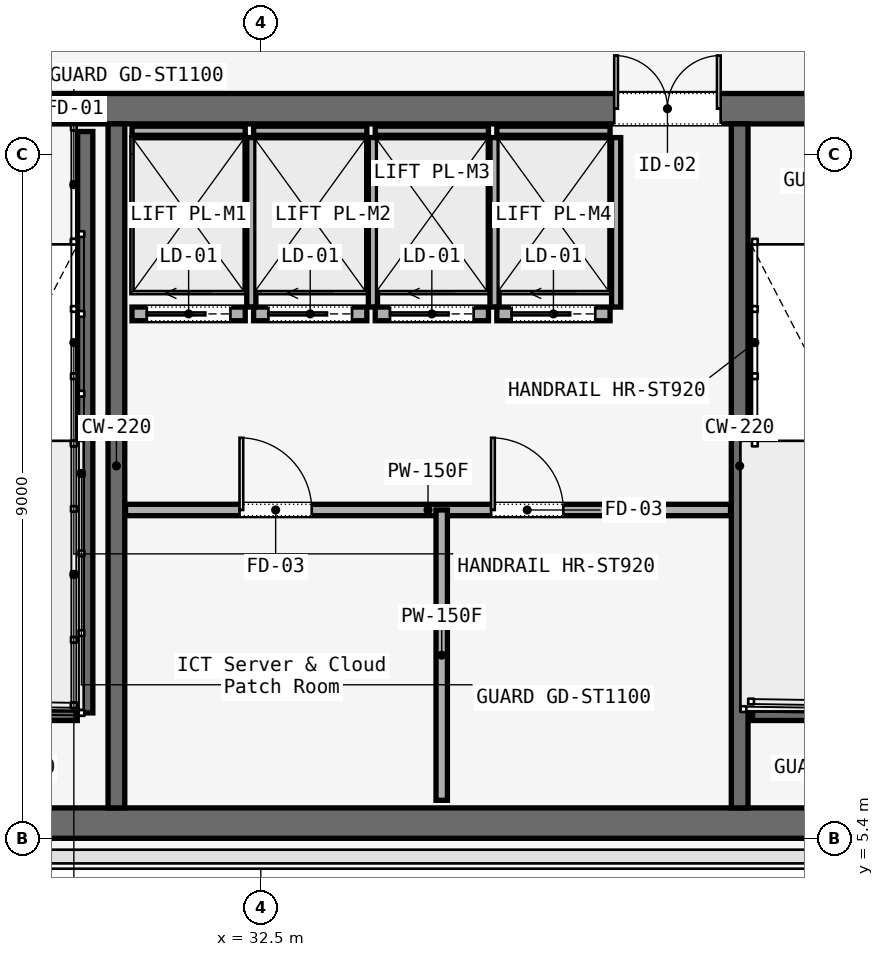
"""IFC4 building model, lengths in metres.
Left out: names, types, materials, properties, quantities, classifications, styles, units other than length and angle.
Written with IfcOpenShell. Run it as: python <this file> out.ifc"""

import sys

from ifc_helpers import new_model, si_unit, direction, frame, frame_2d, origin, place, context, subcontext, project, spatial, rectangle, extrude, element, fill, save


model = new_model("IFC4")
c1 = context("Model", 3, precision=1e-05, world=origin(), true_north=direction((0.0, 1.0)))
c2 = subcontext(c1, "Body", "Model", "MODEL_VIEW")
j1 = project(units=[si_unit("LENGTHUNIT", "METRE"), si_unit("PLANEANGLEUNIT", "RADIAN")], contexts=[c1])
p1 = place(None, origin())
s1 = spatial("IfcSite", under=j1, at=p1, CompositionType="ELEMENT")
p2 = place(p1, origin())
s2 = spatial("IfcBuilding", under=s1, at=p2, CompositionType="ELEMENT")
p3 = place(p2, frame((0.0, 0.0, 191.6)))
s3 = spatial("IfcBuildingStorey", under=s2, at=p3, CompositionType="ELEMENT", Elevation=191.6)
p4 = place(p3, frame((26.45, 15.0, 0.0), z_axis=(0.0, 0.0, 1.0), x_axis=(1.0, 0.0, 0.0)))
e1 = element("IfcWall", 1, at=p4, inside=s3, PredefinedType="SOLIDWALL", context=c2, shape_type="SweptSolid", body=[
    extrude(rectangle(XDim=31.1, YDim=0.4, at=frame_2d((15.55, 0.0))), origin(), (0.0, 0.0, 1.0), 3.58),
])
p5 = place(p4, frame((1.65, 0.0, 0.0)))
e2 = element("IfcOpeningElement", 2, at=p5, cuts=e1, PredefinedType="OPENING", context=c2, shape_type="SweptSolid", body=[
    extrude(rectangle(XDim=1.1, YDim=2.2, at=frame_2d((0.55, 1.1))), frame((0.0, 0.2, 0.0), z_axis=(0.0, -1.0, 0.0), x_axis=(1.0, 0.0, 0.0)), (0.0, 0.0, 1.0), 0.4),
])
p6 = place(p4, frame((13.65, 0.0, 0.0)))
e3 = element("IfcOpeningElement", 3, at=p6, cuts=e1, PredefinedType="OPENING", context=c2, shape_type="SweptSolid", body=[
    extrude(rectangle(XDim=1.1, YDim=2.2, at=frame_2d((0.55, 1.1))), frame((0.0, 0.2, 0.0), z_axis=(0.0, -1.0, 0.0), x_axis=(1.0, 0.0, 0.0)), (0.0, 0.0, 1.0), 0.4),
])
p7 = place(p4, frame((25.55, 0.0, 0.0)))
e4 = element("IfcOpeningElement", 4, at=p7, cuts=e1, PredefinedType="OPENING", context=c2, shape_type="SweptSolid", body=[
    extrude(rectangle(XDim=1.1, YDim=2.2, at=frame_2d((0.55, 1.1))), frame((0.0, 0.2, 0.0), z_axis=(0.0, -1.0, 0.0), x_axis=(1.0, 0.0, 0.0)), (0.0, 0.0, 1.0), 0.4),
])
p8 = place(p4, frame((10.7, 0.0, 0.0)))
e5 = element("IfcOpeningElement", 5, at=p8, cuts=e1, PredefinedType="OPENING", context=c2, shape_type="SweptSolid", body=[
    extrude(rectangle(XDim=1.4, YDim=2.2, at=frame_2d((0.7, 1.1))), frame((0.0, 0.2, 0.0), z_axis=(0.0, -1.0, 0.0), x_axis=(1.0, 0.0, 0.0)), (0.0, 0.0, 1.0), 0.4),
])
p9 = place(p4, frame((19.35, 0.0, 0.0)))
e6 = element("IfcOpeningElement", 6, at=p9, cuts=e1, PredefinedType="OPENING", context=c2, shape_type="SweptSolid", body=[
    extrude(rectangle(XDim=1.1, YDim=2.2, at=frame_2d((0.55, 1.1))), frame((0.0, 0.2, 0.0), z_axis=(0.0, -1.0, 0.0), x_axis=(1.0, 0.0, 0.0)), (0.0, 0.0, 1.0), 0.4),
])
p10 = place(p4, frame((21.4, 0.0, 0.0)))
e7 = element("IfcOpeningElement", 7, at=p10, cuts=e1, PredefinedType="OPENING", context=c2, shape_type="SweptSolid", body=[
    extrude(rectangle(XDim=0.9, YDim=2.1, at=frame_2d((0.45, 1.05))), frame((0.0, 0.2, 0.0), z_axis=(0.0, -1.0, 0.0), x_axis=(1.0, 0.0, 0.0)), (0.0, 0.0, 1.0), 0.4),
])
p11 = place(p4, frame((23.35, 0.0, 0.0)))
e8 = element("IfcOpeningElement", 8, at=p11, cuts=e1, PredefinedType="OPENING", context=c2, shape_type="SweptSolid", body=[
    extrude(rectangle(XDim=1.3, YDim=2.3, at=frame_2d((0.65, 1.15))), frame((0.0, 0.2, 0.0), z_axis=(0.0, -1.0, 0.0), x_axis=(1.0, 0.0, 0.0)), (0.0, 0.0, 1.0), 0.4),
])
p12 = place(p3, frame((26.45, 5.6, 0.0), z_axis=(0.0, 0.0, 1.0), x_axis=(1.0, 0.0, 0.0)))
e9 = element("IfcWall", 9, at=p12, inside=s3, PredefinedType="SOLIDWALL", context=c2, shape_type="SweptSolid", body=[
    extrude(rectangle(XDim=31.1, YDim=0.4, at=frame_2d((15.55, 0.0))), origin(), (0.0, 0.0, 1.0), 3.58),
])
for number, where, z_axis, x_axis in (
    (10, (30.6, 5.8, 0.0), (0.0, 0.0, 1.0), (0.0, 1.0, 0.0)),
    (11, (38.8, 5.8, 0.0), (0.0, 0.0, 1.0), (0.0, 1.0, 0.0)),
):
    element("IfcWall", number, at=place(p3, frame(where, z_axis=z_axis, x_axis=x_axis)), inside=s3, PredefinedType="SOLIDWALL", context=c2, shape_type="SweptSolid", body=[
        extrude(rectangle(XDim=9.0, YDim=0.22, at=frame_2d((4.5, 0.0))), origin(), (0.0, 0.0, 1.0), 3.58),
    ])
p13 = place(p3, frame((30.19, 14.7, 0.0), z_axis=(0.0, 0.0, 1.0), x_axis=(0.0, -1.0, 0.0)))
e12 = element("IfcWall", 12, at=p13, inside=s3, PredefinedType="SOLIDWALL", context=c2, shape_type="SweptSolid", body=[
    extrude(rectangle(XDim=7.65, YDim=0.2, at=frame_2d((3.825, 0.0))), origin(), (0.0, 0.0, 1.0), 3.8),
])
for number, where, z_axis, x_axis in (
    (13, (26.97, 7.05, 0.0), (0.0, 0.0, 1.0), (1.0, 0.0, 0.0)),
    (14, (38.97, 7.05, 0.0), (0.0, 0.0, 1.0), (1.0, 0.0, 0.0)),
):
    element("IfcWall", number, at=place(p3, frame(where, z_axis=z_axis, x_axis=x_axis)), inside=s3, PredefinedType="SOLIDWALL", context=c2, shape_type="SweptSolid", body=[
        extrude(rectangle(XDim=3.115, YDim=0.2, at=frame_2d((1.558, 0.0))), origin(), (0.0, 0.0, 1.0), 3.8),
    ])
p14 = place(p3, frame((30.72, 9.72, 0.0), z_axis=(0.0, 0.0, 1.0), x_axis=(1.0, 0.0, 0.0)))
e15 = element("IfcWall", 15, at=p14, inside=s3, PredefinedType="PARTITIONING", context=c2, shape_type="SweptSolid", body=[
    extrude(rectangle(XDim=7.96, YDim=0.15, at=frame_2d((3.98, 0.0))), origin(), (0.0, 0.0, 1.0), 3.01),
])
p15 = place(p14, frame((1.5, 0.0, 0.0)))
e16 = element("IfcOpeningElement", 16, at=p15, cuts=e15, PredefinedType="OPENING", context=c2, shape_type="SweptSolid", body=[
    extrude(rectangle(XDim=0.95, YDim=2.2, at=frame_2d((0.475, 1.1))), frame((0.0, 0.075, 0.0), z_axis=(0.0, -1.0, 0.0), x_axis=(1.0, 0.0, 0.0)), (0.0, 0.0, 1.0), 0.15),
])
p16 = place(p14, frame((4.81, 0.0, 0.0)))
e17 = element("IfcOpeningElement", 17, at=p16, cuts=e15, PredefinedType="OPENING", context=c2, shape_type="SweptSolid", body=[
    extrude(rectangle(XDim=0.95, YDim=2.2, at=frame_2d((0.475, 1.1))), frame((0.0, 0.075, 0.0), z_axis=(0.0, -1.0, 0.0), x_axis=(1.0, 0.0, 0.0)), (0.0, 0.0, 1.0), 0.15),
])
p17 = place(p3, frame((34.88, 5.9, 0.0), z_axis=(0.0, 0.0, 1.0), x_axis=(0.0, 1.0, 0.0)))
e18 = element("IfcWall", 18, at=p17, inside=s3, PredefinedType="PARTITIONING", context=c2, shape_type="SweptSolid", body=[
    extrude(rectangle(XDim=3.82, YDim=0.15, at=frame_2d((1.91, 0.0))), origin(), (0.0, 0.0, 1.0), 3.01),
])
p18 = place(p3, frame((30.805, 12.3, 0.0), z_axis=(0.0, 0.0, 1.0), x_axis=(1.0, 0.0, 0.0)))
e19 = element("IfcWall", 19, at=p18, inside=s3, PredefinedType="SOLIDWALL", context=c2, shape_type="SweptSolid", body=[
    extrude(rectangle(XDim=1.49, YDim=0.18, at=frame_2d((0.745, 0.0))), origin(), (0.0, 0.0, 1.0), 3.01),
])
p19 = place(p18, frame((0.195, 0.0, 0.0)))
e20 = element("IfcOpeningElement", 20, at=p19, cuts=e19, PredefinedType="OPENING", context=c2, shape_type="SweptSolid", body=[
    extrude(rectangle(XDim=1.1, YDim=2.2, at=frame_2d((0.55, 1.1))), frame((0.0, 0.09, 0.0), z_axis=(0.0, -1.0, 0.0), x_axis=(1.0, 0.0, 0.0)), (0.0, 0.0, 1.0), 0.18),
])
p20 = place(p3, frame((30.805, 14.71, 0.0), z_axis=(0.0, 0.0, 1.0), x_axis=(1.0, 0.0, 0.0)))
e21 = element("IfcWall", 21, at=p20, inside=s3, PredefinedType="SOLIDWALL", context=c2, shape_type="SweptSolid", body=[
    extrude(rectangle(XDim=1.49, YDim=0.12, at=frame_2d((0.745, 0.0))), origin(), (0.0, 0.0, 1.0), 3.01),
])
p21 = place(p3, frame((32.375, 12.39, 0.0), z_axis=(0.0, 0.0, 1.0), x_axis=(0.0, 1.0, 0.0)))
e22 = element("IfcWall", 22, at=p21, inside=s3, PredefinedType="SOLIDWALL", context=c2, shape_type="SweptSolid", body=[
    extrude(rectangle(XDim=2.23, YDim=0.12, at=frame_2d((1.115, 0.0))), origin(), (0.0, 0.0, 1.0), 3.01),
])
p22 = place(p3, frame((32.405, 12.3, 0.0), z_axis=(0.0, 0.0, 1.0), x_axis=(1.0, 0.0, 0.0)))
e23 = element("IfcWall", 23, at=p22, inside=s3, PredefinedType="SOLIDWALL", context=c2, shape_type="SweptSolid", body=[
    extrude(rectangle(XDim=1.49, YDim=0.18, at=frame_2d((0.745, 0.0))), origin(), (0.0, 0.0, 1.0), 3.01),
])
p23 = place(p22, frame((0.195, 0.0, 0.0)))
e24 = element("IfcOpeningElement", 24, at=p23, cuts=e23, PredefinedType="OPENING", context=c2, shape_type="SweptSolid", body=[
    extrude(rectangle(XDim=1.1, YDim=2.2, at=frame_2d((0.55, 1.1))), frame((0.0, 0.09, 0.0), z_axis=(0.0, -1.0, 0.0), x_axis=(1.0, 0.0, 0.0)), (0.0, 0.0, 1.0), 0.18),
])
p24 = place(p3, frame((32.405, 14.71, 0.0), z_axis=(0.0, 0.0, 1.0), x_axis=(1.0, 0.0, 0.0)))
e25 = element("IfcWall", 25, at=p24, inside=s3, PredefinedType="SOLIDWALL", context=c2, shape_type="SweptSolid", body=[
    extrude(rectangle(XDim=1.49, YDim=0.12, at=frame_2d((0.745, 0.0))), origin(), (0.0, 0.0, 1.0), 3.01),
])
p25 = place(p3, frame((33.975, 12.39, 0.0), z_axis=(0.0, 0.0, 1.0), x_axis=(0.0, 1.0, 0.0)))
e26 = element("IfcWall", 26, at=p25, inside=s3, PredefinedType="SOLIDWALL", context=c2, shape_type="SweptSolid", body=[
    extrude(rectangle(XDim=2.23, YDim=0.12, at=frame_2d((1.115, 0.0))), origin(), (0.0, 0.0, 1.0), 3.01),
])
p26 = place(p3, frame((34.005, 12.3, 0.0), z_axis=(0.0, 0.0, 1.0), x_axis=(1.0, 0.0, 0.0)))
e27 = element("IfcWall", 27, at=p26, inside=s3, PredefinedType="SOLIDWALL", context=c2, shape_type="SweptSolid", body=[
    extrude(rectangle(XDim=1.49, YDim=0.18, at=frame_2d((0.745, 0.0))), origin(), (0.0, 0.0, 1.0), 3.01),
])
p27 = place(p26, frame((0.195, 0.0, 0.0)))
e28 = element("IfcOpeningElement", 28, at=p27, cuts=e27, PredefinedType="OPENING", context=c2, shape_type="SweptSolid", body=[
    extrude(rectangle(XDim=1.1, YDim=2.2, at=frame_2d((0.55, 1.1))), frame((0.0, 0.09, 0.0), z_axis=(0.0, -1.0, 0.0), x_axis=(1.0, 0.0, 0.0)), (0.0, 0.0, 1.0), 0.18),
])
p28 = place(p3, frame((34.005, 14.71, 0.0), z_axis=(0.0, 0.0, 1.0), x_axis=(1.0, 0.0, 0.0)))
e29 = element("IfcWall", 29, at=p28, inside=s3, PredefinedType="SOLIDWALL", context=c2, shape_type="SweptSolid", body=[
    extrude(rectangle(XDim=1.49, YDim=0.12, at=frame_2d((0.745, 0.0))), origin(), (0.0, 0.0, 1.0), 3.01),
])
p29 = place(p3, frame((35.575, 12.39, 0.0), z_axis=(0.0, 0.0, 1.0), x_axis=(0.0, 1.0, 0.0)))
e30 = element("IfcWall", 30, at=p29, inside=s3, PredefinedType="SOLIDWALL", context=c2, shape_type="SweptSolid", body=[
    extrude(rectangle(XDim=2.23, YDim=0.12, at=frame_2d((1.115, 0.0))), origin(), (0.0, 0.0, 1.0), 3.01),
])
p30 = place(p3, frame((35.605, 12.3, 0.0), z_axis=(0.0, 0.0, 1.0), x_axis=(1.0, 0.0, 0.0)))
e31 = element("IfcWall", 31, at=p30, inside=s3, PredefinedType="SOLIDWALL", context=c2, shape_type="SweptSolid", body=[
    extrude(rectangle(XDim=1.49, YDim=0.18, at=frame_2d((0.745, 0.0))), origin(), (0.0, 0.0, 1.0), 3.01),
])
p31 = place(p30, frame((0.195, 0.0, 0.0)))
e32 = element("IfcOpeningElement", 32, at=p31, cuts=e31, PredefinedType="OPENING", context=c2, shape_type="SweptSolid", body=[
    extrude(rectangle(XDim=1.1, YDim=2.2, at=frame_2d((0.55, 1.1))), frame((0.0, 0.09, 0.0), z_axis=(0.0, -1.0, 0.0), x_axis=(1.0, 0.0, 0.0)), (0.0, 0.0, 1.0), 0.18),
])
p32 = place(p3, frame((35.605, 14.71, 0.0), z_axis=(0.0, 0.0, 1.0), x_axis=(1.0, 0.0, 0.0)))
e33 = element("IfcWall", 33, at=p32, inside=s3, PredefinedType="SOLIDWALL", context=c2, shape_type="SweptSolid", body=[
    extrude(rectangle(XDim=1.49, YDim=0.12, at=frame_2d((0.745, 0.0))), origin(), (0.0, 0.0, 1.0), 3.01),
])
p33 = place(p3, frame((37.175, 12.39, 0.0), z_axis=(0.0, 0.0, 1.0), x_axis=(0.0, 1.0, 0.0)))
e34 = element("IfcWall", 34, at=p33, inside=s3, PredefinedType="SOLIDWALL", context=c2, shape_type="SweptSolid", body=[
    extrude(rectangle(XDim=2.23, YDim=0.12, at=frame_2d((1.115, 0.0))), origin(), (0.0, 0.0, 1.0), 3.01),
])
p34 = place(p8, origin())
e35 = element("IfcDoor", 35, at=p34, inside=s3, OperationType="DOUBLE_DOOR_SINGLE_SWING", PredefinedType="DOOR", context=c2, shape_type="SweptSolid", body=[
    extrude(rectangle(XDim=1.4, YDim=2.2, at=frame_2d((0.7, 1.1))), frame((0.0, 0.025, 0.0), z_axis=(0.0, -1.0, 0.0), x_axis=(1.0, 0.0, 0.0)), (0.0, 0.0, 1.0), 0.05),
])
fill(e5, e35)
p35 = place(p15, origin())
e36 = element("IfcDoor", 36, at=p35, inside=s3, OperationType="SINGLE_SWING_LEFT", PredefinedType="DOOR", context=c2, shape_type="SweptSolid", body=[
    extrude(rectangle(XDim=0.95, YDim=2.2, at=frame_2d((0.475, 1.1))), frame((0.0, 0.025, 0.0), z_axis=(0.0, -1.0, 0.0), x_axis=(1.0, 0.0, 0.0)), (0.0, 0.0, 1.0), 0.05),
])
fill(e16, e36)
p36 = place(p16, origin())
e37 = element("IfcDoor", 37, at=p36, inside=s3, OperationType="SINGLE_SWING_RIGHT", PredefinedType="DOOR", context=c2, shape_type="SweptSolid", body=[
    extrude(rectangle(XDim=0.95, YDim=2.2, at=frame_2d((0.475, 1.1))), frame((0.0, 0.025, 0.0), z_axis=(0.0, -1.0, 0.0), x_axis=(1.0, 0.0, 0.0)), (0.0, 0.0, 1.0), 0.05),
])
fill(e17, e37)
p37 = place(p19, origin())
e38 = element("IfcDoor", 38, at=p37, inside=s3, OperationType="SLIDING_TO_LEFT", PredefinedType="DOOR", context=c2, shape_type="SweptSolid", body=[
    extrude(rectangle(XDim=1.1, YDim=2.2, at=frame_2d((0.55, 1.1))), frame((0.0, 0.025, 0.0), z_axis=(0.0, -1.0, 0.0), x_axis=(1.0, 0.0, 0.0)), (0.0, 0.0, 1.0), 0.05),
])
fill(e20, e38)
p38 = place(p23, origin())
e39 = element("IfcDoor", 39, at=p38, inside=s3, OperationType="SLIDING_TO_LEFT", PredefinedType="DOOR", context=c2, shape_type="SweptSolid", body=[
    extrude(rectangle(XDim=1.1, YDim=2.2, at=frame_2d((0.55, 1.1))), frame((0.0, 0.025, 0.0), z_axis=(0.0, -1.0, 0.0), x_axis=(1.0, 0.0, 0.0)), (0.0, 0.0, 1.0), 0.05),
])
fill(e24, e39)
p39 = place(p27, origin())
e40 = element("IfcDoor", 40, at=p39, inside=s3, OperationType="SLIDING_TO_LEFT", PredefinedType="DOOR", context=c2, shape_type="SweptSolid", body=[
    extrude(rectangle(XDim=1.1, YDim=2.2, at=frame_2d((0.55, 1.1))), frame((0.0, 0.025, 0.0), z_axis=(0.0, -1.0, 0.0), x_axis=(1.0, 0.0, 0.0)), (0.0, 0.0, 1.0), 0.05),
])
fill(e28, e40)
p40 = place(p31, origin())
e41 = element("IfcDoor", 41, at=p40, inside=s3, OperationType="SLIDING_TO_LEFT", PredefinedType="DOOR", context=c2, shape_type="SweptSolid", body=[
    extrude(rectangle(XDim=1.1, YDim=2.2, at=frame_2d((0.55, 1.1))), frame((0.0, 0.025, 0.0), z_axis=(0.0, -1.0, 0.0), x_axis=(1.0, 0.0, 0.0)), (0.0, 0.0, 1.0), 0.05),
])
fill(e32, e41)
save(model, sys.argv[1])
